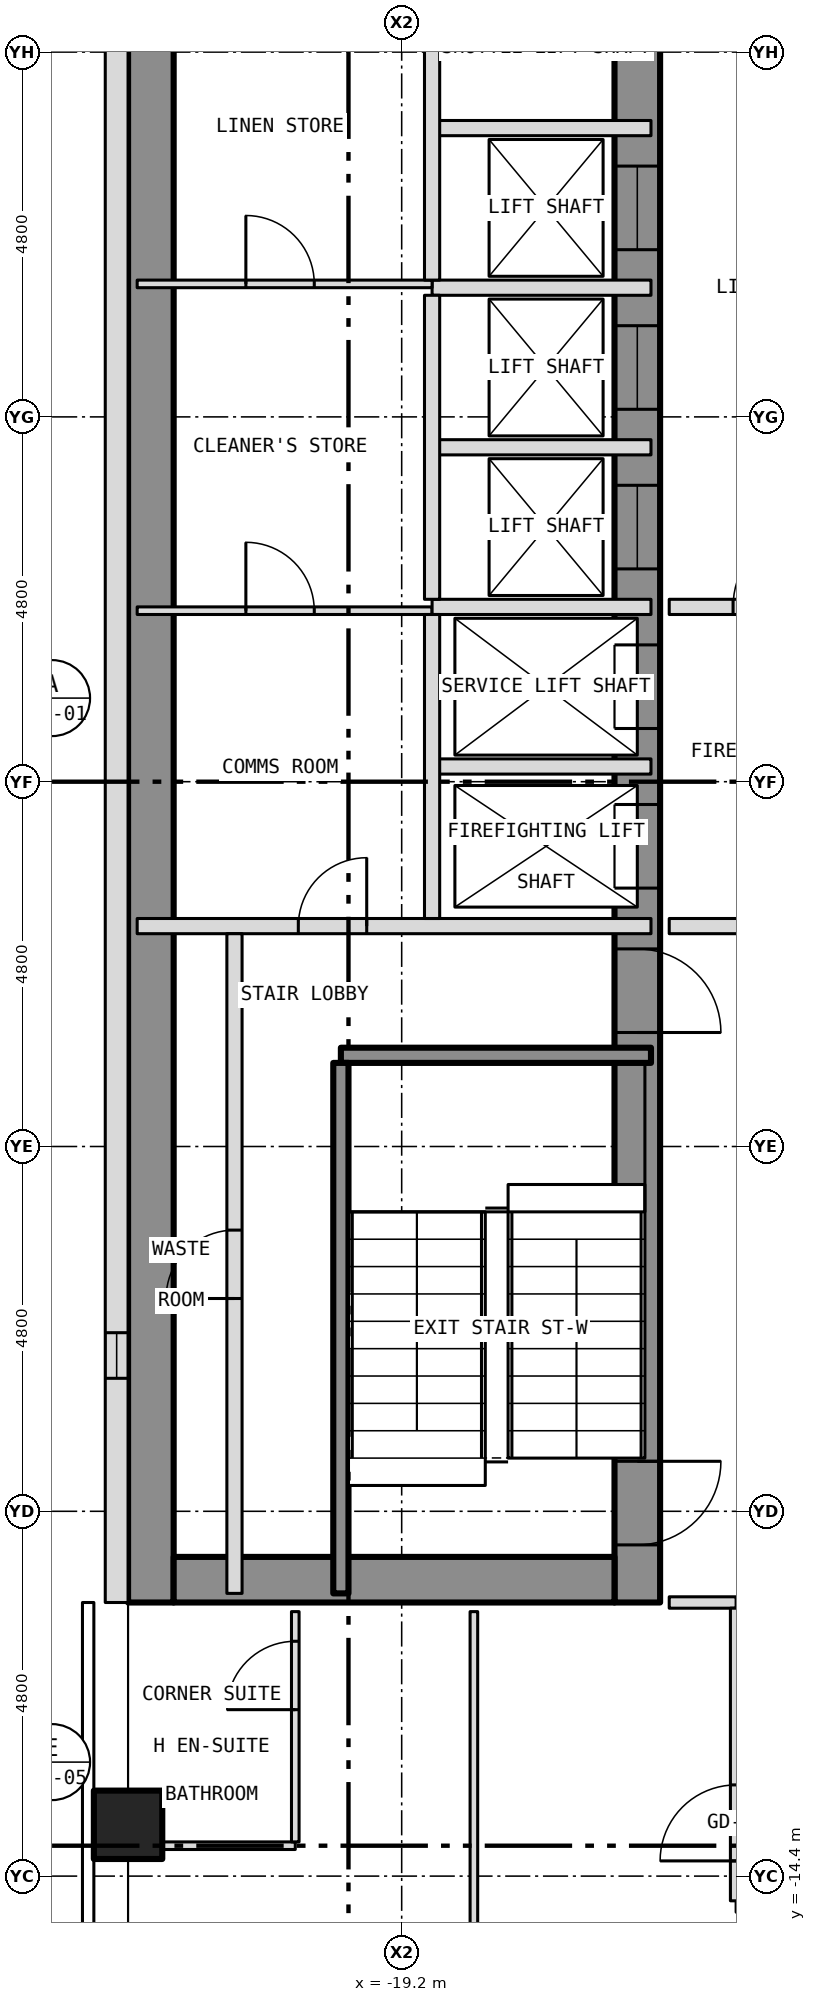
"""IFC4 building model, lengths in metres.
Left out: names, types, materials, properties, quantities, classifications, styles, units other than length and angle.
Written with IfcOpenShell. Run it as: python <this file> out.ifc"""

import sys

from ifc_helpers import new_model, si_unit, direction, frame, frame_2d, origin, origin_2d, place, context, subcontext, project, spatial, rectangle, hollow_rectangle, extrude, element, fill, save


model = new_model("IFC4")
c1 = context("Model", 3, precision=1e-05, world=origin(), true_north=direction((0.0, 1.0)))
c2 = subcontext(c1, "Body", "Model", "MODEL_VIEW")
j1 = project(units=[si_unit("LENGTHUNIT", "METRE"), si_unit("PLANEANGLEUNIT", "RADIAN")], contexts=[c1])
p1 = place(None, origin())
s1 = spatial("IfcSite", under=j1, at=p1, CompositionType="ELEMENT")
p2 = place(p1, origin())
s2 = spatial("IfcBuilding", under=s1, at=p2, CompositionType="ELEMENT")
p3 = place(p2, frame((0.0, 0.0, 99.5)))
s3 = spatial("IfcBuildingStorey", under=s2, at=p3, CompositionType="ELEMENT", Elevation=99.5)
p4 = place(p3, frame((-22.8, -13.725, -0.15), z_axis=(0.0, 0.0, 1.0), x_axis=(1.0, 0.0, 0.0)))
e1 = element("IfcColumn", 1, at=p4, inside=s3, PredefinedType="COLUMN", context=c2, shape_type="SweptSolid", body=[
    extrude(hollow_rectangle(XDim=0.9, YDim=0.9, WallThickness=0.05, at=origin_2d()), origin(), (0.0, 0.0, 1.0), 3.5),
])
p5 = place(p3, frame((-16.1, -10.8, 0.0), z_axis=(0.0, 0.0, 1.0), x_axis=(0.0, 1.0, 0.0)))
e2 = element("IfcWall", 2, at=p5, inside=s3, PredefinedType="SHEAR", context=c2, shape_type="SweptSolid", body=[
    extrude(rectangle(XDim=21.6, YDim=0.6, at=frame_2d((10.8, 0.0))), origin(), (0.0, 0.0, 1.0), 3.25),
])
p6 = place(p5, frame((9.4, 0.0, 0.0)))
e3 = element("IfcOpeningElement", 3, at=p6, cuts=e2, PredefinedType="OPENING", context=c2, shape_type="SweptSolid", body=[
    extrude(rectangle(XDim=1.1, YDim=2.1, at=frame_2d((0.55, 1.05))), frame((0.0, 0.312, 0.0), z_axis=(0.0, -1.0, 0.0), x_axis=(1.0, 0.0, 0.0)), (0.0, 0.0, 1.0), 0.624),
])
p7 = place(p5, frame((11.5, 0.0, 0.0)))
e4 = element("IfcOpeningElement", 4, at=p7, cuts=e2, PredefinedType="OPENING", context=c2, shape_type="SweptSolid", body=[
    extrude(rectangle(XDim=1.1, YDim=2.1, at=frame_2d((0.55, 1.05))), frame((0.0, 0.312, 0.0), z_axis=(0.0, -1.0, 0.0), x_axis=(1.0, 0.0, 0.0)), (0.0, 0.0, 1.0), 0.624),
])
p8 = place(p5, frame((13.6, 0.0, 0.0)))
e5 = element("IfcOpeningElement", 5, at=p8, cuts=e2, PredefinedType="OPENING", context=c2, shape_type="SweptSolid", body=[
    extrude(rectangle(XDim=1.1, YDim=2.1, at=frame_2d((0.55, 1.05))), frame((0.0, 0.312, 0.0), z_axis=(0.0, -1.0, 0.0), x_axis=(1.0, 0.0, 0.0)), (0.0, 0.0, 1.0), 0.624),
])
p9 = place(p5, frame((15.7, 0.0, 0.0)))
e6 = element("IfcOpeningElement", 6, at=p9, cuts=e2, PredefinedType="OPENING", context=c2, shape_type="SweptSolid", body=[
    extrude(rectangle(XDim=1.1, YDim=2.1, at=frame_2d((0.55, 1.05))), frame((0.0, 0.312, 0.0), z_axis=(0.0, -1.0, 0.0), x_axis=(1.0, 0.0, 0.0)), (0.0, 0.0, 1.0), 0.624),
])
p10 = place(p5, frame((17.8, 0.0, 0.0)))
e7 = element("IfcOpeningElement", 7, at=p10, cuts=e2, PredefinedType="OPENING", context=c2, shape_type="SweptSolid", body=[
    extrude(rectangle(XDim=1.1, YDim=2.1, at=frame_2d((0.55, 1.05))), frame((0.0, 0.312, 0.0), z_axis=(0.0, -1.0, 0.0), x_axis=(1.0, 0.0, 0.0)), (0.0, 0.0, 1.0), 0.624),
])
p11 = place(p5, frame((0.758, 0.0, 0.0)))
e8 = element("IfcOpeningElement", 8, at=p11, cuts=e2, PredefinedType="OPENING", context=c2, shape_type="SweptSolid", body=[
    extrude(rectangle(XDim=1.1, YDim=2.1, at=frame_2d((0.55, 1.05))), frame((0.0, 0.312, 0.0), z_axis=(0.0, -1.0, 0.0), x_axis=(1.0, 0.0, 0.0)), (0.0, 0.0, 1.0), 0.624),
])
p12 = place(p5, frame((7.5, 0.0, 0.0)))
e9 = element("IfcOpeningElement", 9, at=p12, cuts=e2, PredefinedType="OPENING", context=c2, shape_type="SweptSolid", body=[
    extrude(rectangle(XDim=1.1, YDim=2.1, at=frame_2d((0.55, 1.05))), frame((0.0, 0.312, 0.0), z_axis=(0.0, -1.0, 0.0), x_axis=(1.0, 0.0, 0.0)), (0.0, 0.0, 1.0), 0.624),
])
p13 = place(p3, frame((-22.5, -10.8, 0.0), z_axis=(0.0, 0.0, 1.0), x_axis=(0.0, 1.0, 0.0)))
e10 = element("IfcWall", 10, at=p13, inside=s3, PredefinedType="SHEAR", context=c2, shape_type="SweptSolid", body=[
    extrude(rectangle(XDim=21.6, YDim=0.6, at=frame_2d((10.8, 0.0))), origin(), (0.0, 0.0, 1.0), 3.25),
])
p14 = place(p3, frame((-22.2, -10.5, 0.0), z_axis=(0.0, 0.0, 1.0), x_axis=(1.0, 0.0, 0.0)))
e11 = element("IfcWall", 11, at=p14, inside=s3, PredefinedType="SHEAR", context=c2, shape_type="SweptSolid", body=[
    extrude(rectangle(XDim=5.8, YDim=0.6, at=frame_2d((2.9, 0.0))), origin(), (0.0, 0.0, 1.0), 3.25),
])
p15 = place(p3, frame((-22.95, 10.8, 0.0), z_axis=(0.0, 0.0, 1.0), x_axis=(0.0, -1.0, 0.0)))
e12 = element("IfcWall", 12, at=p15, inside=s3, PredefinedType="SOLIDWALL", context=c2, shape_type="SweptSolid", body=[
    extrude(rectangle(XDim=21.6, YDim=0.3, at=frame_2d((10.8, 0.0))), origin(), (0.0, 0.0, 1.0), 3.5),
])
p16 = place(p15, frame((18.05, 0.0, 1.0)))
e13 = element("IfcOpeningElement", 13, at=p16, cuts=e12, PredefinedType="OPENING", context=c2, shape_type="SweptSolid", body=[
    extrude(rectangle(XDim=0.6, YDim=1.5, at=frame_2d((0.3, 0.75))), frame((0.0, 0.162, 0.0), z_axis=(0.0, -1.0, 0.0), x_axis=(1.0, 0.0, 0.0)), (0.0, 0.0, 1.0), 0.324),
])
p17 = place(p3, frame((-22.68, -14.0, 0.0), z_axis=(0.0, 0.0, 1.0), x_axis=(1.0, 0.0, 0.0)))
e14 = element("IfcWall", 14, at=p17, inside=s3, PredefinedType="PARTITIONING", context=c2, shape_type="SweptSolid", body=[
    extrude(rectangle(XDim=2.08, YDim=0.1, at=frame_2d((1.04, 0.0))), origin(), (0.0, 0.0, 1.0), 3.35),
])
p18 = place(p3, frame((-15.68, -10.8, 0.0), z_axis=(0.0, 0.0, 1.0), x_axis=(1.0, 0.0, 0.0)))
e15 = element("IfcWall", 15, at=p18, inside=s3, PredefinedType="PARTITIONING", context=c2, shape_type="SweptSolid", body=[
    extrude(rectangle(XDim=0.88, YDim=0.15, at=frame_2d((0.44, 0.0))), origin(), (0.0, 0.0, 1.0), 3.35),
])
p19 = place(p3, frame((-20.0, -3.6, 0.0), z_axis=(0.0, 0.0, 1.0), x_axis=(1.0, 0.0, 0.0)))
e16 = element("IfcWall", 16, at=p19, inside=s3, PredefinedType="SHEAR", context=c2, shape_type="SweptSolid", body=[
    extrude(rectangle(XDim=4.08, YDim=0.2, at=frame_2d((2.04, 0.0))), origin(), (0.0, 0.0, 1.0), 3.25),
])
p20 = place(p3, frame((-22.68, -1.9, 0.0), z_axis=(0.0, 0.0, 1.0), x_axis=(1.0, 0.0, 0.0)))
e17 = element("IfcWall", 17, at=p20, inside=s3, PredefinedType="PARTITIONING", context=c2, shape_type="SweptSolid", body=[
    extrude(rectangle(XDim=6.76, YDim=0.2, at=frame_2d((3.38, 0.0))), origin(), (0.0, 0.0, 1.0), 3.25),
])
p21 = place(p20, frame((2.12, 0.0, 0.0)))
e18 = element("IfcOpeningElement", 18, at=p21, cuts=e17, PredefinedType="OPENING", context=c2, shape_type="SweptSolid", body=[
    extrude(rectangle(XDim=0.9, YDim=2.1, at=frame_2d((0.45, 1.05))), frame((0.0, 0.112, 0.0), z_axis=(0.0, -1.0, 0.0), x_axis=(1.0, 0.0, 0.0)), (0.0, 0.0, 1.0), 0.224),
])
p22 = place(p3, frame((-15.68, -1.9, 0.0), z_axis=(0.0, 0.0, 1.0), x_axis=(1.0, 0.0, 0.0)))
e19 = element("IfcWall", 19, at=p22, inside=s3, PredefinedType="PARTITIONING", context=c2, shape_type="SweptSolid", body=[
    extrude(rectangle(XDim=3.28, YDim=0.2, at=frame_2d((1.64, 0.0))), origin(), (0.0, 0.0, 1.0), 3.35),
])
p23 = place(p22, frame((0.94, 0.0, 0.0)))
e20 = element("IfcOpeningElement", 20, at=p23, cuts=e19, PredefinedType="OPENING", context=c2, shape_type="SweptSolid", body=[
    extrude(rectangle(XDim=1.1, YDim=2.1, at=frame_2d((0.55, 1.05))), frame((0.0, 0.112, 0.0), z_axis=(0.0, -1.0, 0.0), x_axis=(1.0, 0.0, 0.0)), (0.0, 0.0, 1.0), 0.224),
])
p24 = place(p3, frame((-18.8, 0.2, 0.0), z_axis=(0.0, 0.0, 1.0), x_axis=(1.0, 0.0, 0.0)))
e21 = element("IfcWall", 21, at=p24, inside=s3, PredefinedType="PARTITIONING", context=c2, shape_type="SweptSolid", body=[
    extrude(rectangle(XDim=2.88, YDim=0.2, at=frame_2d((1.44, 0.0))), origin(), (0.0, 0.0, 1.0), 3.25),
])
p25 = place(p3, frame((-22.68, 2.25, 0.0), z_axis=(0.0, 0.0, 1.0), x_axis=(1.0, 0.0, 0.0)))
e22 = element("IfcWall", 22, at=p25, inside=s3, PredefinedType="PARTITIONING", context=c2, shape_type="SweptSolid", body=[
    extrude(rectangle(XDim=3.88, YDim=0.1, at=frame_2d((1.94, 0.0))), origin(), (0.0, 0.0, 1.0), 3.25),
])
p26 = place(p25, frame((1.43, 0.0, 0.0)))
e23 = element("IfcOpeningElement", 23, at=p26, cuts=e22, PredefinedType="OPENING", context=c2, shape_type="SweptSolid", body=[
    extrude(rectangle(XDim=0.9, YDim=2.1, at=frame_2d((0.45, 1.05))), frame((0.0, 0.062, 0.0), z_axis=(0.0, -1.0, 0.0), x_axis=(1.0, 0.0, 0.0)), (0.0, 0.0, 1.0), 0.124),
])
p27 = place(p3, frame((-18.8, 2.3, 0.0), z_axis=(0.0, 0.0, 1.0), x_axis=(1.0, 0.0, 0.0)))
e24 = element("IfcWall", 24, at=p27, inside=s3, PredefinedType="PARTITIONING", context=c2, shape_type="SweptSolid", body=[
    extrude(rectangle(XDim=2.88, YDim=0.2, at=frame_2d((1.44, 0.0))), origin(), (0.0, 0.0, 1.0), 3.25),
])
p28 = place(p3, frame((-15.68, 2.3, 0.0), z_axis=(0.0, 0.0, 1.0), x_axis=(1.0, 0.0, 0.0)))
e25 = element("IfcWall", 25, at=p28, inside=s3, PredefinedType="PARTITIONING", context=c2, shape_type="SweptSolid", body=[
    extrude(rectangle(XDim=3.28, YDim=0.2, at=frame_2d((1.64, 0.0))), origin(), (0.0, 0.0, 1.0), 3.35),
])
p29 = place(p28, frame((0.84, 0.0, 0.0)))
e26 = element("IfcOpeningElement", 26, at=p29, cuts=e25, PredefinedType="OPENING", context=c2, shape_type="SweptSolid", body=[
    extrude(rectangle(XDim=1.1, YDim=2.1, at=frame_2d((0.55, 1.05))), frame((0.0, 0.112, 0.0), z_axis=(0.0, -1.0, 0.0), x_axis=(1.0, 0.0, 0.0)), (0.0, 0.0, 1.0), 0.224),
])
for number, where, z_axis, x_axis in (
    (27, (-18.8, 4.4, 0.0), (0.0, 0.0, 1.0), (1.0, 0.0, 0.0)),
    (28, (-18.8, 6.5, 0.0), (0.0, 0.0, 1.0), (1.0, 0.0, 0.0)),
):
    element("IfcWall", number, at=place(p3, frame(where, z_axis=z_axis, x_axis=x_axis)), inside=s3, PredefinedType="PARTITIONING", context=c2, shape_type="SweptSolid", body=[
        extrude(rectangle(XDim=2.88, YDim=0.2, at=frame_2d((1.44, 0.0))), origin(), (0.0, 0.0, 1.0), 3.25),
    ])
p30 = place(p3, frame((-22.68, 6.55, 0.0), z_axis=(0.0, 0.0, 1.0), x_axis=(1.0, 0.0, 0.0)))
e29 = element("IfcWall", 29, at=p30, inside=s3, PredefinedType="PARTITIONING", context=c2, shape_type="SweptSolid", body=[
    extrude(rectangle(XDim=3.88, YDim=0.1, at=frame_2d((1.94, 0.0))), origin(), (0.0, 0.0, 1.0), 3.25),
])
p31 = place(p30, frame((1.43, 0.0, 0.0)))
e30 = element("IfcOpeningElement", 30, at=p31, cuts=e29, PredefinedType="OPENING", context=c2, shape_type="SweptSolid", body=[
    extrude(rectangle(XDim=0.9, YDim=2.1, at=frame_2d((0.45, 1.05))), frame((0.0, 0.062, 0.0), z_axis=(0.0, -1.0, 0.0), x_axis=(1.0, 0.0, 0.0)), (0.0, 0.0, 1.0), 0.124),
])
p32 = place(p3, frame((-18.8, 8.6, 0.0), z_axis=(0.0, 0.0, 1.0), x_axis=(1.0, 0.0, 0.0)))
e31 = element("IfcWall", 31, at=p32, inside=s3, PredefinedType="PARTITIONING", context=c2, shape_type="SweptSolid", body=[
    extrude(rectangle(XDim=2.88, YDim=0.2, at=frame_2d((1.44, 0.0))), origin(), (0.0, 0.0, 1.0), 3.25),
])
p33 = place(p3, frame((-21.4, -10.68, 0.0), z_axis=(0.0, 0.0, 1.0), x_axis=(0.0, 1.0, 0.0)))
e32 = element("IfcWall", 32, at=p33, inside=s3, PredefinedType="PARTITIONING", context=c2, shape_type="SweptSolid", body=[
    extrude(rectangle(XDim=8.68, YDim=0.2, at=frame_2d((4.34, 0.0))), origin(), (0.0, 0.0, 1.0), 3.25),
])
p34 = place(p33, frame((3.88, 0.0, 0.0)))
e33 = element("IfcOpeningElement", 33, at=p34, cuts=e32, PredefinedType="OPENING", context=c2, shape_type="SweptSolid", body=[
    extrude(rectangle(XDim=0.9, YDim=2.1, at=frame_2d((0.45, 1.05))), frame((0.0, 0.112, 0.0), z_axis=(0.0, -1.0, 0.0), x_axis=(1.0, 0.0, 0.0)), (0.0, 0.0, 1.0), 0.224),
])
p35 = place(p3, frame((-20.6, -13.95, 0.0), z_axis=(0.0, 0.0, 1.0), x_axis=(0.0, 1.0, 0.0)))
e34 = element("IfcWall", 34, at=p35, inside=s3, PredefinedType="PARTITIONING", context=c2, shape_type="SweptSolid", body=[
    extrude(rectangle(XDim=3.03, YDim=0.1, at=frame_2d((1.515, 0.0))), origin(), (0.0, 0.0, 1.0), 3.35),
])
p36 = place(p35, frame((1.74, 0.0, 0.0)))
e35 = element("IfcOpeningElement", 35, at=p36, cuts=e34, PredefinedType="OPENING", context=c2, shape_type="SweptSolid", body=[
    extrude(rectangle(XDim=0.9, YDim=2.1, at=frame_2d((0.45, 1.05))), frame((0.0, 0.062, 0.0), z_axis=(0.0, -1.0, 0.0), x_axis=(1.0, 0.0, 0.0)), (0.0, 0.0, 1.0), 0.124),
])
p37 = place(p3, frame((-20.0, -10.68, 0.0), z_axis=(0.0, 0.0, 1.0), x_axis=(0.0, 1.0, 0.0)))
e36 = element("IfcWall", 36, at=p37, inside=s3, PredefinedType="SHEAR", context=c2, shape_type="SweptSolid", body=[
    extrude(rectangle(XDim=6.98, YDim=0.2, at=frame_2d((3.49, 0.0))), origin(), (0.0, 0.0, 1.0), 3.25),
])
for number, where, z_axis, x_axis in (
    (37, (-18.8, -1.8, 0.0), (0.0, 0.0, 1.0), (0.0, 1.0, 0.0)),
    (38, (-18.8, 2.4, 0.0), (0.0, 0.0, 1.0), (0.0, 1.0, 0.0)),
):
    element("IfcWall", number, at=place(p3, frame(where, z_axis=z_axis, x_axis=x_axis)), inside=s3, PredefinedType="PARTITIONING", context=c2, shape_type="SweptSolid", body=[
        extrude(rectangle(XDim=4.0, YDim=0.2, at=frame_2d((2.0, 0.0))), origin(), (0.0, 0.0, 1.0), 3.25),
    ])
p38 = place(p3, frame((-18.8, 6.6, 0.0), z_axis=(0.0, 0.0, 1.0), x_axis=(0.0, 1.0, 0.0)))
e39 = element("IfcWall", 39, at=p38, inside=s3, PredefinedType="PARTITIONING", context=c2, shape_type="SweptSolid", body=[
    extrude(rectangle(XDim=4.08, YDim=0.2, at=frame_2d((2.04, 0.0))), origin(), (0.0, 0.0, 1.0), 3.25),
])
p39 = place(p3, frame((-18.25, -18.191, 0.0), z_axis=(0.0, 0.0, 1.0), x_axis=(0.0, 1.0, 0.0)))
e40 = element("IfcWall", 40, at=p39, inside=s3, PredefinedType="PARTITIONING", context=c2, shape_type="SweptSolid", body=[
    extrude(rectangle(XDim=7.271, YDim=0.1, at=frame_2d((3.635, 0.0))), origin(), (0.0, 0.0, 1.0), 3.35),
])
p40 = place(p39, frame((0.941, 0.0, 0.0)))
e41 = element("IfcOpeningElement", 41, at=p40, cuts=e40, PredefinedType="OPENING", context=c2, shape_type="SweptSolid", body=[
    extrude(rectangle(XDim=0.9, YDim=2.1, at=frame_2d((0.45, 1.05))), frame((0.0, 0.062, 0.0), z_axis=(0.0, -1.0, 0.0), x_axis=(1.0, 0.0, 0.0)), (0.0, 0.0, 1.0), 0.124),
])
p41 = place(p3, frame((-14.8, -14.725, 0.0), z_axis=(0.0, 0.0, 1.0), x_axis=(0.0, 1.0, 0.0)))
e42 = element("IfcWall", 42, at=p41, inside=s3, PredefinedType="PARTITIONING", context=c2, shape_type="SweptSolid", body=[
    extrude(rectangle(XDim=3.85, YDim=0.15, at=frame_2d((1.925, 0.0))), origin(), (0.0, 0.0, 1.0), 3.35),
])
p42 = place(p41, frame((0.525, 0.0, 0.0)))
e43 = element("IfcOpeningElement", 43, at=p42, cuts=e42, PredefinedType="OPENING", context=c2, shape_type="SweptSolid", body=[
    extrude(rectangle(XDim=1.0, YDim=2.1, at=frame_2d((0.5, 1.05))), frame((0.0, 0.087, 0.0), z_axis=(0.0, -1.0, 0.0), x_axis=(1.0, 0.0, 0.0)), (0.0, 0.0, 1.0), 0.174),
])
p43 = place(p16, origin())
e44 = element("IfcWindow", 44, at=p43, inside=s3, PartitioningType="SINGLE_PANEL", PredefinedType="WINDOW", context=c2, shape_type="SweptSolid", body=[
    extrude(rectangle(XDim=0.6, YDim=1.5, at=frame_2d((0.3, 0.75))), frame((0.0, -0.06, 0.0), z_axis=(0.0, -1.0, 0.0), x_axis=(1.0, 0.0, 0.0)), (0.0, 0.0, 1.0), 0.06),
])
fill(e13, e44)
p44 = place(p6, origin())
e45 = element("IfcDoor", 45, at=p44, inside=s3, OperationType="SLIDING_TO_LEFT", PredefinedType="DOOR", context=c2, shape_type="SweptSolid", body=[
    extrude(rectangle(XDim=1.1, YDim=2.1, at=frame_2d((0.55, 1.05))), frame((0.0, 0.025, 0.0), z_axis=(0.0, -1.0, 0.0), x_axis=(1.0, 0.0, 0.0)), (0.0, 0.0, 1.0), 0.05),
])
fill(e3, e45)
p45 = place(p7, origin())
e46 = element("IfcDoor", 46, at=p45, inside=s3, OperationType="SLIDING_TO_LEFT", PredefinedType="DOOR", context=c2, shape_type="SweptSolid", body=[
    extrude(rectangle(XDim=1.1, YDim=2.1, at=frame_2d((0.55, 1.05))), frame((0.0, 0.025, 0.0), z_axis=(0.0, -1.0, 0.0), x_axis=(1.0, 0.0, 0.0)), (0.0, 0.0, 1.0), 0.05),
])
fill(e4, e46)
p46 = place(p8, origin())
e47 = element("IfcDoor", 47, at=p46, inside=s3, OperationType="SLIDING_TO_LEFT", PredefinedType="DOOR", context=c2, shape_type="SweptSolid", body=[
    extrude(rectangle(XDim=1.1, YDim=2.1, at=frame_2d((0.55, 1.05))), frame((0.0, 0.025, 0.0), z_axis=(0.0, -1.0, 0.0), x_axis=(1.0, 0.0, 0.0)), (0.0, 0.0, 1.0), 0.05),
])
fill(e5, e47)
p47 = place(p9, origin())
e48 = element("IfcDoor", 48, at=p47, inside=s3, OperationType="SLIDING_TO_LEFT", PredefinedType="DOOR", context=c2, shape_type="SweptSolid", body=[
    extrude(rectangle(XDim=1.1, YDim=2.1, at=frame_2d((0.55, 1.05))), frame((0.0, 0.025, 0.0), z_axis=(0.0, -1.0, 0.0), x_axis=(1.0, 0.0, 0.0)), (0.0, 0.0, 1.0), 0.05),
])
fill(e6, e48)
p48 = place(p10, origin())
e49 = element("IfcDoor", 49, at=p48, inside=s3, OperationType="SLIDING_TO_LEFT", PredefinedType="DOOR", context=c2, shape_type="SweptSolid", body=[
    extrude(rectangle(XDim=1.1, YDim=2.1, at=frame_2d((0.55, 1.05))), frame((0.0, 0.025, 0.0), z_axis=(0.0, -1.0, 0.0), x_axis=(1.0, 0.0, 0.0)), (0.0, 0.0, 1.0), 0.05),
])
fill(e7, e49)
p49 = place(p11, origin())
e50 = element("IfcDoor", 50, at=p49, inside=s3, OperationType="SINGLE_SWING_RIGHT", PredefinedType="DOOR", context=c2, shape_type="SweptSolid", body=[
    extrude(rectangle(XDim=1.1, YDim=2.1, at=frame_2d((0.55, 1.05))), frame((0.0, 0.025, 0.0), z_axis=(0.0, -1.0, 0.0), x_axis=(1.0, 0.0, 0.0)), (0.0, 0.0, 1.0), 0.05),
])
fill(e8, e50)
p50 = place(p12, origin())
e51 = element("IfcDoor", 51, at=p50, inside=s3, OperationType="SINGLE_SWING_LEFT", PredefinedType="DOOR", context=c2, shape_type="SweptSolid", body=[
    extrude(rectangle(XDim=1.1, YDim=2.1, at=frame_2d((0.55, 1.05))), frame((0.0, 0.025, 0.0), z_axis=(0.0, -1.0, 0.0), x_axis=(1.0, 0.0, 0.0)), (0.0, 0.0, 1.0), 0.05),
])
fill(e9, e51)
p51 = place(p34, origin())
e52 = element("IfcDoor", 52, at=p51, inside=s3, OperationType="SINGLE_SWING_LEFT", PredefinedType="DOOR", context=c2, shape_type="SweptSolid", body=[
    extrude(rectangle(XDim=0.9, YDim=2.1, at=frame_2d((0.45, 1.05))), frame((0.0, 0.025, 0.0), z_axis=(0.0, -1.0, 0.0), x_axis=(1.0, 0.0, 0.0)), (0.0, 0.0, 1.0), 0.05),
])
fill(e33, e52)
p52 = place(p21, origin())
e53 = element("IfcDoor", 53, at=p52, inside=s3, OperationType="SINGLE_SWING_RIGHT", PredefinedType="DOOR", context=c2, shape_type="SweptSolid", body=[
    extrude(rectangle(XDim=0.9, YDim=2.1, at=frame_2d((0.45, 1.05))), frame((0.0, 0.025, 0.0), z_axis=(0.0, -1.0, 0.0), x_axis=(1.0, 0.0, 0.0)), (0.0, 0.0, 1.0), 0.05),
])
fill(e18, e53)
p53 = place(p26, origin())
e54 = element("IfcDoor", 54, at=p53, inside=s3, OperationType="SINGLE_SWING_LEFT", PredefinedType="DOOR", context=c2, shape_type="SweptSolid", body=[
    extrude(rectangle(XDim=0.9, YDim=2.1, at=frame_2d((0.45, 1.05))), frame((0.0, 0.025, 0.0), z_axis=(0.0, -1.0, 0.0), x_axis=(1.0, 0.0, 0.0)), (0.0, 0.0, 1.0), 0.05),
])
fill(e23, e54)
p54 = place(p31, origin())
e55 = element("IfcDoor", 55, at=p54, inside=s3, OperationType="SINGLE_SWING_LEFT", PredefinedType="DOOR", context=c2, shape_type="SweptSolid", body=[
    extrude(rectangle(XDim=0.9, YDim=2.1, at=frame_2d((0.45, 1.05))), frame((0.0, 0.025, 0.0), z_axis=(0.0, -1.0, 0.0), x_axis=(1.0, 0.0, 0.0)), (0.0, 0.0, 1.0), 0.05),
])
fill(e30, e55)
p55 = place(p29, origin())
e56 = element("IfcDoor", 56, at=p55, inside=s3, OperationType="SINGLE_SWING_RIGHT", PredefinedType="DOOR", context=c2, shape_type="SweptSolid", body=[
    extrude(rectangle(XDim=1.1, YDim=2.1, at=frame_2d((0.55, 1.05))), frame((0.0, 0.025, 0.0), z_axis=(0.0, -1.0, 0.0), x_axis=(1.0, 0.0, 0.0)), (0.0, 0.0, 1.0), 0.05),
])
fill(e26, e56)
p56 = place(p42, origin())
e57 = element("IfcDoor", 57, at=p56, inside=s3, OperationType="SINGLE_SWING_LEFT", PredefinedType="DOOR", context=c2, shape_type="SweptSolid", body=[
    extrude(rectangle(XDim=1.0, YDim=2.1, at=frame_2d((0.5, 1.05))), frame((0.0, 0.025, 0.0), z_axis=(0.0, -1.0, 0.0), x_axis=(1.0, 0.0, 0.0)), (0.0, 0.0, 1.0), 0.05),
])
fill(e43, e57)
p57 = place(p36, origin())
e58 = element("IfcDoor", 58, at=p57, inside=s3, OperationType="SINGLE_SWING_LEFT", PredefinedType="DOOR", context=c2, shape_type="SweptSolid", body=[
    extrude(rectangle(XDim=0.9, YDim=2.1, at=frame_2d((0.45, 1.05))), frame((0.0, 0.025, 0.0), z_axis=(0.0, -1.0, 0.0), x_axis=(1.0, 0.0, 0.0)), (0.0, 0.0, 1.0), 0.05),
])
fill(e35, e58)
save(model, sys.argv[1])
